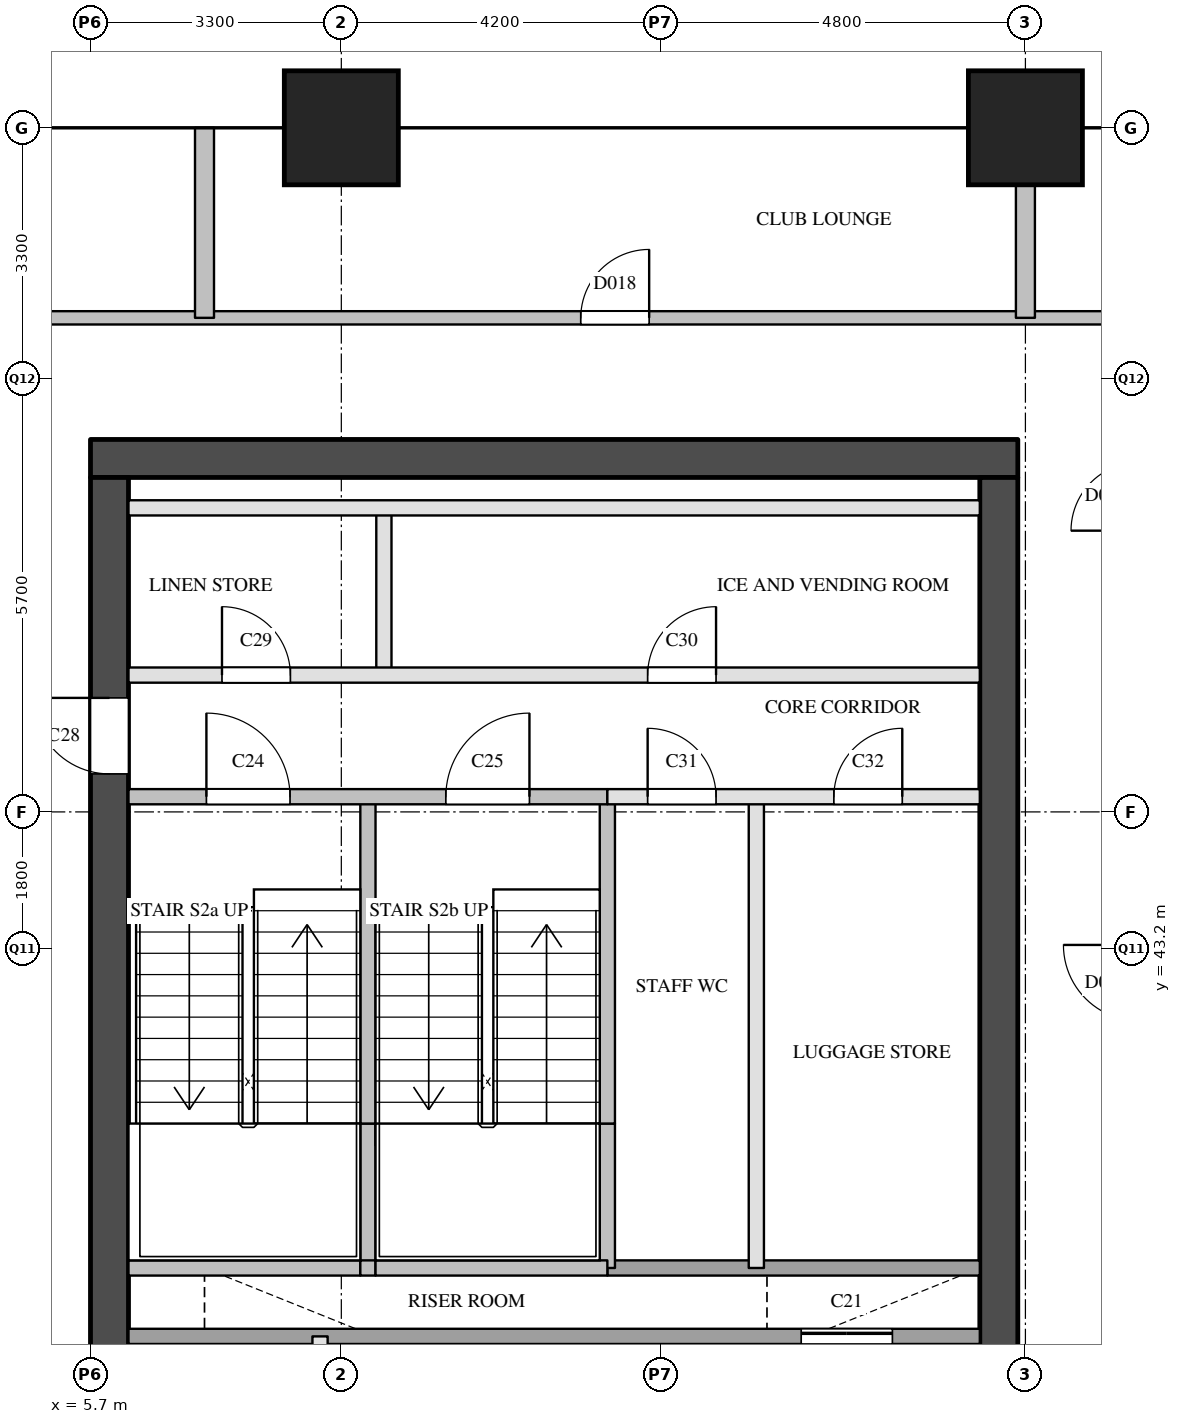
"""IFC4 building model, lengths in metres.
Left out: names, types, materials, properties, quantities, classifications, styles, units other than length and angle.
Written with IfcOpenShell. Run it as: python <this file> out.ifc"""

import sys

from ifc_helpers import new_model, si_unit, direction, frame, frame_2d, origin, origin_2d, place, context, subcontext, project, spatial, rectangle, extrude, element, fill, save


model = new_model("IFC4")
c1 = context("Model", 3, precision=1e-05, world=origin(), true_north=direction((0.0, 1.0)))
c2 = subcontext(c1, "Body", "Model", "MODEL_VIEW")
j1 = project(units=[si_unit("LENGTHUNIT", "METRE"), si_unit("PLANEANGLEUNIT", "RADIAN")], contexts=[c1])
p1 = place(None, origin())
s1 = spatial("IfcSite", under=j1, at=p1, CompositionType="ELEMENT")
p2 = place(p1, origin())
s2 = spatial("IfcBuilding", under=s1, at=p2, CompositionType="ELEMENT")
p3 = place(p2, frame((0.0, 0.0, 146.6)))
s3 = spatial("IfcBuildingStorey", under=s2, at=p3, CompositionType="ELEMENT", Elevation=146.6)
for number, where, z_axis, x_axis in (
    (1, (9.0, 54.0, 0.0), (0.0, 0.0, 1.0), (1.0, 0.0, 0.0)),
    (2, (18.0, 54.0, 0.0), (0.0, 0.0, 1.0), (1.0, 0.0, 0.0)),
):
    element("IfcColumn", number, at=place(p3, frame(where, z_axis=z_axis, x_axis=x_axis)), inside=s3, PredefinedType="COLUMN", context=c2, shape_type="SweptSolid", body=[
        extrude(rectangle(XDim=1.5, YDim=1.5, at=origin_2d()), origin(), (0.0, 0.0, 1.0), 3.9),
    ])
p4 = place(p3, frame((5.7, 49.65, 0.0), z_axis=(0.0, 0.0, 1.0), x_axis=(1.0, 0.0, 0.0)))
e3 = element("IfcWall", 3, at=p4, inside=s3, PredefinedType="SHEAR", context=c2, shape_type="SweptSolid", body=[
    extrude(rectangle(XDim=12.2, YDim=0.5, at=frame_2d((6.1, 0.0))), origin(), (0.0, 0.0, 1.0), 3.6),
])
p5 = place(p3, frame((5.95, 29.1, 0.0), z_axis=(0.0, 0.0, 1.0), x_axis=(0.0, 1.0, 0.0)))
e4 = element("IfcWall", 4, at=p5, inside=s3, PredefinedType="SHEAR", context=c2, shape_type="SweptSolid", body=[
    extrude(rectangle(XDim=20.3, YDim=0.5, at=frame_2d((10.15, 0.0))), origin(), (0.0, 0.0, 1.0), 3.6),
])
p6 = place(p5, frame((3.45, 0.0, 0.0)))
e5 = element("IfcOpeningElement", 5, at=p6, cuts=e4, PredefinedType="OPENING", context=c2, shape_type="SweptSolid", body=[
    extrude(rectangle(XDim=1.0, YDim=2.1, at=frame_2d((0.5, 1.05))), frame((0.0, 0.26, 0.0), z_axis=(0.0, -1.0, 0.0), x_axis=(1.0, 0.0, 0.0)), (0.0, 0.0, 1.0), 0.52),
])
p7 = place(p5, frame((16.4, 0.0, 0.0)))
e6 = element("IfcOpeningElement", 6, at=p7, cuts=e4, PredefinedType="OPENING", context=c2, shape_type="SweptSolid", body=[
    extrude(rectangle(XDim=1.0, YDim=2.1, at=frame_2d((0.5, 1.05))), frame((0.0, 0.26, 0.0), z_axis=(0.0, -1.0, 0.0), x_axis=(1.0, 0.0, 0.0)), (0.0, 0.0, 1.0), 0.52),
])
p8 = place(p3, frame((17.65, 29.1, 0.0), z_axis=(0.0, 0.0, 1.0), x_axis=(0.0, 1.0, 0.0)))
e7 = element("IfcWall", 7, at=p8, inside=s3, PredefinedType="SHEAR", context=c2, shape_type="SweptSolid", body=[
    extrude(rectangle(XDim=20.3, YDim=0.5, at=frame_2d((10.15, 0.0))), origin(), (0.0, 0.0, 1.0), 3.6),
])
p9 = place(p8, frame((1.25, 0.0, 0.0)))
e8 = element("IfcOpeningElement", 8, at=p9, cuts=e7, PredefinedType="OPENING", context=c2, shape_type="SweptSolid", body=[
    extrude(rectangle(XDim=0.7, YDim=2.1, at=frame_2d((0.35, 1.05))), frame((0.0, 0.26, 0.0), z_axis=(0.0, -1.0, 0.0), x_axis=(1.0, 0.0, 0.0)), (0.0, 0.0, 1.0), 0.52),
])
p10 = place(p8, frame((7.05, 0.0, 0.0)))
e9 = element("IfcOpeningElement", 9, at=p10, cuts=e7, PredefinedType="OPENING", context=c2, shape_type="SweptSolid", body=[
    extrude(rectangle(XDim=0.7, YDim=2.1, at=frame_2d((0.35, 1.05))), frame((0.0, 0.26, 0.0), z_axis=(0.0, -1.0, 0.0), x_axis=(1.0, 0.0, 0.0)), (0.0, 0.0, 1.0), 0.52),
])
p11 = place(p8, frame((3.6, 0.0, 0.0)))
e10 = element("IfcOpeningElement", 10, at=p11, cuts=e7, PredefinedType="OPENING", context=c2, shape_type="SweptSolid", body=[
    extrude(rectangle(XDim=1.8, YDim=2.1, at=frame_2d((0.9, 1.05))), frame((0.0, 0.26, 0.0), z_axis=(0.0, -1.0, 0.0), x_axis=(1.0, 0.0, 0.0)), (0.0, 0.0, 1.0), 0.52),
])
p12 = place(p3, frame((8.72, 33.8, 0.0), z_axis=(0.0, 0.0, 1.0), x_axis=(0.0, 1.0, 0.0)))
e11 = element("IfcWall", 11, at=p12, inside=s3, PredefinedType="PARTITIONING", context=c2, shape_type="SweptSolid", body=[
    extrude(rectangle(XDim=4.3, YDim=0.2, at=frame_2d((2.15, 0.0))), origin(), (0.0, 0.0, 1.0), 3.6),
])
p13 = place(p3, frame((9.35, 39.0, 0.0), z_axis=(0.0, 0.0, 1.0), x_axis=(0.0, 1.0, 0.0)))
e12 = element("IfcWall", 12, at=p13, inside=s3, PredefinedType="SOLIDWALL", context=c2, shape_type="SweptSolid", body=[
    extrude(rectangle(XDim=1.9, YDim=0.2, at=frame_2d((0.95, 0.0))), origin(), (0.0, 0.0, 1.0), 3.6),
])
p14 = place(p3, frame((9.35, 40.9, 0.0), z_axis=(0.0, 0.0, 1.0), x_axis=(0.0, 1.0, 0.0)))
e13 = element("IfcWall", 13, at=p14, inside=s3, PredefinedType="SOLIDWALL", context=c2, shape_type="SweptSolid", body=[
    extrude(rectangle(XDim=4.3, YDim=0.2, at=frame_2d((2.15, 0.0))), origin(), (0.0, 0.0, 1.0), 3.6),
])
p15 = place(p3, frame((9.56, 46.8, 0.0), z_axis=(0.0, 0.0, 1.0), x_axis=(0.0, 1.0, 0.0)))
e14 = element("IfcWall", 14, at=p15, inside=s3, PredefinedType="PARTITIONING", context=c2, shape_type="SweptSolid", body=[
    extrude(rectangle(XDim=2.2, YDim=0.2, at=frame_2d((1.1, 0.0))), origin(), (0.0, 0.0, 1.0), 3.6),
])
p16 = place(p3, frame((12.5, 39.0, 0.0), z_axis=(0.0, 0.0, 1.0), x_axis=(0.0, 1.0, 0.0)))
e15 = element("IfcWall", 15, at=p16, inside=s3, PredefinedType="SOLIDWALL", context=c2, shape_type="SweptSolid", body=[
    extrude(rectangle(XDim=1.9, YDim=0.2, at=frame_2d((0.95, 0.0))), origin(), (0.0, 0.0, 1.0), 3.6),
])
p17 = place(p3, frame((12.5, 40.9, 0.0), z_axis=(0.0, 0.0, 1.0), x_axis=(0.0, 1.0, 0.0)))
e16 = element("IfcWall", 16, at=p17, inside=s3, PredefinedType="SOLIDWALL", context=c2, shape_type="SweptSolid", body=[
    extrude(rectangle(XDim=4.3, YDim=0.2, at=frame_2d((2.15, 0.0))), origin(), (0.0, 0.0, 1.0), 3.6),
])
p18 = place(p3, frame((14.46, 39.0, 0.0), z_axis=(0.0, 0.0, 1.0), x_axis=(0.0, 1.0, 0.0)))
e17 = element("IfcWall", 17, at=p18, inside=s3, PredefinedType="PARTITIONING", context=c2, shape_type="SweptSolid", body=[
    extrude(rectangle(XDim=6.2, YDim=0.2, at=frame_2d((3.1, 0.0))), origin(), (0.0, 0.0, 1.0), 3.6),
])
for number, where, z_axis, x_axis in (
    (18, (14.6, 34.9, 0.0), (0.0, 0.0, 1.0), (0.0, 1.0, 0.0)),
    (19, (16.7, 34.9, 0.0), (0.0, 0.0, 1.0), (0.0, 1.0, 0.0)),
):
    element("IfcWall", number, at=place(p3, frame(where, z_axis=z_axis, x_axis=x_axis)), inside=s3, PredefinedType="SOLIDWALL", context=c2, shape_type="SweptSolid", body=[
        extrude(rectangle(XDim=3.2, YDim=0.2, at=frame_2d((1.6, 0.0))), origin(), (0.0, 0.0, 1.0), 3.6),
    ])
p19 = place(p3, frame((6.2, 38.1, 0.0), z_axis=(0.0, 0.0, 1.0), x_axis=(1.0, 0.0, 0.0)))
e20 = element("IfcWall", 20, at=p19, inside=s3, PredefinedType="SOLIDWALL", context=c2, shape_type="SweptSolid", body=[
    extrude(rectangle(XDim=11.2, YDim=0.2, at=frame_2d((5.6, 0.0))), origin(), (0.0, 0.0, 1.0), 3.6),
])
p20 = place(p19, frame((8.85, 0.0, 0.0)))
e21 = element("IfcOpeningElement", 21, at=p20, cuts=e20, PredefinedType="OPENING", context=c2, shape_type="SweptSolid", body=[
    extrude(rectangle(XDim=1.2, YDim=2.1, at=frame_2d((0.6, 1.05))), frame((0.0, 0.11, 0.0), z_axis=(0.0, -1.0, 0.0), x_axis=(1.0, 0.0, 0.0)), (0.0, 0.0, 1.0), 0.22),
])
p21 = place(p3, frame((12.5, 39.0, 0.0), z_axis=(0.0, 0.0, 1.0), x_axis=(1.0, 0.0, 0.0)))
e22 = element("IfcWall", 22, at=p21, inside=s3, PredefinedType="SOLIDWALL", context=c2, shape_type="SweptSolid", body=[
    extrude(rectangle(XDim=4.9, YDim=0.2, at=frame_2d((2.45, 0.0))), origin(), (0.0, 0.0, 1.0), 3.6),
])
p22 = place(p3, frame((6.2, 39.0, 0.0), z_axis=(0.0, 0.0, 1.0), x_axis=(1.0, 0.0, 0.0)))
e23 = element("IfcWall", 23, at=p22, inside=s3, PredefinedType="SOLIDWALL", context=c2, shape_type="SweptSolid", body=[
    extrude(rectangle(XDim=3.05, YDim=0.2, at=frame_2d((1.525, 0.0))), origin(), (0.0, 0.0, 1.0), 3.6),
])
p23 = place(p3, frame((9.25, 39.0, 0.0), z_axis=(0.0, 0.0, 1.0), x_axis=(1.0, 0.0, 0.0)))
e24 = element("IfcWall", 24, at=p23, inside=s3, PredefinedType="SOLIDWALL", context=c2, shape_type="SweptSolid", body=[
    extrude(rectangle(XDim=0.2, YDim=0.2, at=frame_2d((0.1, 0.0))), origin(), (0.0, 0.0, 1.0), 3.6),
])
p24 = place(p3, frame((9.45, 39.0, 0.0), z_axis=(0.0, 0.0, 1.0), x_axis=(1.0, 0.0, 0.0)))
e25 = element("IfcWall", 25, at=p24, inside=s3, PredefinedType="SOLIDWALL", context=c2, shape_type="SweptSolid", body=[
    extrude(rectangle(XDim=3.05, YDim=0.2, at=frame_2d((1.525, 0.0))), origin(), (0.0, 0.0, 1.0), 3.6),
])
p25 = place(p3, frame((12.5, 45.2, 0.0), z_axis=(0.0, 0.0, 1.0), x_axis=(1.0, 0.0, 0.0)))
e26 = element("IfcWall", 26, at=p25, inside=s3, PredefinedType="PARTITIONING", context=c2, shape_type="SweptSolid", body=[
    extrude(rectangle(XDim=4.9, YDim=0.2, at=frame_2d((2.45, 0.0))), origin(), (0.0, 0.0, 1.0), 3.6),
])
p26 = place(p25, frame((0.53, 0.0, 0.0)))
e27 = element("IfcOpeningElement", 27, at=p26, cuts=e26, PredefinedType="OPENING", context=c2, shape_type="SweptSolid", body=[
    extrude(rectangle(XDim=0.9, YDim=2.1, at=frame_2d((0.45, 1.05))), frame((0.0, 0.11, 0.0), z_axis=(0.0, -1.0, 0.0), x_axis=(1.0, 0.0, 0.0)), (0.0, 0.0, 1.0), 0.22),
])
p27 = place(p25, frame((2.98, 0.0, 0.0)))
e28 = element("IfcOpeningElement", 28, at=p27, cuts=e26, PredefinedType="OPENING", context=c2, shape_type="SweptSolid", body=[
    extrude(rectangle(XDim=0.9, YDim=2.1, at=frame_2d((0.45, 1.05))), frame((0.0, 0.11, 0.0), z_axis=(0.0, -1.0, 0.0), x_axis=(1.0, 0.0, 0.0)), (0.0, 0.0, 1.0), 0.22),
])
p28 = place(p3, frame((6.2, 45.2, 0.0), z_axis=(0.0, 0.0, 1.0), x_axis=(1.0, 0.0, 0.0)))
e29 = element("IfcWall", 29, at=p28, inside=s3, PredefinedType="SOLIDWALL", context=c2, shape_type="SweptSolid", body=[
    extrude(rectangle(XDim=6.3, YDim=0.2, at=frame_2d((3.15, 0.0))), origin(), (0.0, 0.0, 1.0), 3.6),
])
p29 = place(p28, frame((1.025, 0.0, 0.0)))
e30 = element("IfcOpeningElement", 30, at=p29, cuts=e29, PredefinedType="OPENING", context=c2, shape_type="SweptSolid", body=[
    extrude(rectangle(XDim=1.1, YDim=2.1, at=frame_2d((0.55, 1.05))), frame((0.0, 0.11, 0.0), z_axis=(0.0, -1.0, 0.0), x_axis=(1.0, 0.0, 0.0)), (0.0, 0.0, 1.0), 0.22),
])
p30 = place(p28, frame((4.175, 0.0, 0.0)))
e31 = element("IfcOpeningElement", 31, at=p30, cuts=e29, PredefinedType="OPENING", context=c2, shape_type="SweptSolid", body=[
    extrude(rectangle(XDim=1.1, YDim=2.1, at=frame_2d((0.55, 1.05))), frame((0.0, 0.11, 0.0), z_axis=(0.0, -1.0, 0.0), x_axis=(1.0, 0.0, 0.0)), (0.0, 0.0, 1.0), 0.22),
])
p31 = place(p3, frame((6.2, 46.8, 0.0), z_axis=(0.0, 0.0, 1.0), x_axis=(1.0, 0.0, 0.0)))
e32 = element("IfcWall", 32, at=p31, inside=s3, PredefinedType="PARTITIONING", context=c2, shape_type="SweptSolid", body=[
    extrude(rectangle(XDim=11.2, YDim=0.2, at=frame_2d((5.6, 0.0))), origin(), (0.0, 0.0, 1.0), 3.6),
])
p32 = place(p31, frame((1.23, 0.0, 0.0)))
e33 = element("IfcOpeningElement", 33, at=p32, cuts=e32, PredefinedType="OPENING", context=c2, shape_type="SweptSolid", body=[
    extrude(rectangle(XDim=0.9, YDim=2.1, at=frame_2d((0.45, 1.05))), frame((0.0, 0.11, 0.0), z_axis=(0.0, -1.0, 0.0), x_axis=(1.0, 0.0, 0.0)), (0.0, 0.0, 1.0), 0.22),
])
p33 = place(p31, frame((6.83, 0.0, 0.0)))
e34 = element("IfcOpeningElement", 34, at=p33, cuts=e32, PredefinedType="OPENING", context=c2, shape_type="SweptSolid", body=[
    extrude(rectangle(XDim=0.9, YDim=2.1, at=frame_2d((0.45, 1.05))), frame((0.0, 0.11, 0.0), z_axis=(0.0, -1.0, 0.0), x_axis=(1.0, 0.0, 0.0)), (0.0, 0.0, 1.0), 0.22),
])
p34 = place(p3, frame((6.2, 49.0, 0.0), z_axis=(0.0, 0.0, 1.0), x_axis=(1.0, 0.0, 0.0)))
e35 = element("IfcWall", 35, at=p34, inside=s3, PredefinedType="PARTITIONING", context=c2, shape_type="SweptSolid", body=[
    extrude(rectangle(XDim=11.2, YDim=0.2, at=frame_2d((5.6, 0.0))), origin(), (0.0, 0.0, 1.0), 3.6),
])
p35 = place(p3, frame((4.1, 51.5, 0.0), z_axis=(0.0, 0.0, 1.0), x_axis=(1.0, 0.0, 0.0)))
e36 = element("IfcWall", 36, at=p35, inside=s3, PredefinedType="PARTITIONING", context=c2, shape_type="SweptSolid", body=[
    extrude(rectangle(XDim=15.4, YDim=0.175, at=frame_2d((7.7, 0.0))), origin(), (0.0, 0.0, 1.0), 3.6),
])
p36 = place(p35, frame((8.05, 0.0, 0.0)))
e37 = element("IfcOpeningElement", 37, at=p36, cuts=e36, PredefinedType="OPENING", context=c2, shape_type="SweptSolid", body=[
    extrude(rectangle(XDim=0.9, YDim=2.1, at=frame_2d((0.45, 1.05))), frame((0.0, 0.097, 0.0), z_axis=(0.0, -1.0, 0.0), x_axis=(1.0, 0.0, 0.0)), (0.0, 0.0, 1.0), 0.195),
])
p37 = place(p3, frame((7.2, 51.5, 0.0), z_axis=(0.0, 0.0, 1.0), x_axis=(0.0, 1.0, 0.0)))
e38 = element("IfcWall", 38, at=p37, inside=s3, PredefinedType="PARTITIONING", context=c2, shape_type="SweptSolid", body=[
    extrude(rectangle(XDim=2.5, YDim=0.25, at=frame_2d((1.25, 0.0))), origin(), (0.0, 0.0, 1.0), 2.6),
])
p38 = place(p3, frame((18.0, 51.5, 0.0), z_axis=(0.0, 0.0, 1.0), x_axis=(0.0, 1.0, 0.0)))
e39 = element("IfcWall", 39, at=p38, inside=s3, PredefinedType="PARTITIONING", context=c2, shape_type="SweptSolid", body=[
    extrude(rectangle(XDim=2.5, YDim=0.25, at=frame_2d((1.25, 0.0))), origin(), (0.0, 0.0, 1.0), 3.6),
])
p39 = place(p20, origin())
e40 = element("IfcDoor", 40, at=p39, inside=s3, OperationType="SLIDING_TO_LEFT", PredefinedType="DOOR", context=c2, shape_type="SweptSolid", body=[
    extrude(rectangle(XDim=1.2, YDim=2.1, at=frame_2d((0.6, 1.05))), frame((0.0, 0.025, 0.0), z_axis=(0.0, -1.0, 0.0), x_axis=(1.0, 0.0, 0.0)), (0.0, 0.0, 1.0), 0.05),
])
fill(e21, e40)
p40 = place(p29, origin())
e41 = element("IfcDoor", 41, at=p40, inside=s3, OperationType="SINGLE_SWING_LEFT", PredefinedType="DOOR", context=c2, shape_type="SweptSolid", body=[
    extrude(rectangle(XDim=1.1, YDim=2.1, at=frame_2d((0.55, 1.05))), frame((0.0, 0.025, 0.0), z_axis=(0.0, -1.0, 0.0), x_axis=(1.0, 0.0, 0.0)), (0.0, 0.0, 1.0), 0.05),
])
fill(e30, e41)
p41 = place(p30, origin())
e42 = element("IfcDoor", 42, at=p41, inside=s3, OperationType="SINGLE_SWING_RIGHT", PredefinedType="DOOR", context=c2, shape_type="SweptSolid", body=[
    extrude(rectangle(XDim=1.1, YDim=2.1, at=frame_2d((0.55, 1.05))), frame((0.0, 0.025, 0.0), z_axis=(0.0, -1.0, 0.0), x_axis=(1.0, 0.0, 0.0)), (0.0, 0.0, 1.0), 0.05),
])
fill(e31, e42)
p42 = place(p7, origin())
e43 = element("IfcDoor", 43, at=p42, inside=s3, OperationType="SINGLE_SWING_RIGHT", PredefinedType="DOOR", context=c2, shape_type="SweptSolid", body=[
    extrude(rectangle(XDim=1.0, YDim=2.1, at=frame_2d((0.5, 1.05))), frame((0.0, 0.025, 0.0), z_axis=(0.0, -1.0, 0.0), x_axis=(1.0, 0.0, 0.0)), (0.0, 0.0, 1.0), 0.05),
])
fill(e6, e43)
p43 = place(p32, origin())
e44 = element("IfcDoor", 44, at=p43, inside=s3, OperationType="SINGLE_SWING_LEFT", PredefinedType="DOOR", context=c2, shape_type="SweptSolid", body=[
    extrude(rectangle(XDim=0.9, YDim=2.1, at=frame_2d((0.45, 1.05))), frame((0.0, 0.025, 0.0), z_axis=(0.0, -1.0, 0.0), x_axis=(1.0, 0.0, 0.0)), (0.0, 0.0, 1.0), 0.05),
])
fill(e33, e44)
p44 = place(p33, origin())
e45 = element("IfcDoor", 45, at=p44, inside=s3, OperationType="SINGLE_SWING_RIGHT", PredefinedType="DOOR", context=c2, shape_type="SweptSolid", body=[
    extrude(rectangle(XDim=0.9, YDim=2.1, at=frame_2d((0.45, 1.05))), frame((0.0, 0.025, 0.0), z_axis=(0.0, -1.0, 0.0), x_axis=(1.0, 0.0, 0.0)), (0.0, 0.0, 1.0), 0.05),
])
fill(e34, e45)
p45 = place(p26, origin())
e46 = element("IfcDoor", 46, at=p45, inside=s3, OperationType="SINGLE_SWING_LEFT", PredefinedType="DOOR", context=c2, shape_type="SweptSolid", body=[
    extrude(rectangle(XDim=0.9, YDim=2.1, at=frame_2d((0.45, 1.05))), frame((0.0, 0.025, 0.0), z_axis=(0.0, -1.0, 0.0), x_axis=(1.0, 0.0, 0.0)), (0.0, 0.0, 1.0), 0.05),
])
fill(e27, e46)
p46 = place(p27, origin())
e47 = element("IfcDoor", 47, at=p46, inside=s3, OperationType="SINGLE_SWING_RIGHT", PredefinedType="DOOR", context=c2, shape_type="SweptSolid", body=[
    extrude(rectangle(XDim=0.9, YDim=2.1, at=frame_2d((0.45, 1.05))), frame((0.0, 0.025, 0.0), z_axis=(0.0, -1.0, 0.0), x_axis=(1.0, 0.0, 0.0)), (0.0, 0.0, 1.0), 0.05),
])
fill(e28, e47)
p47 = place(p36, origin())
e48 = element("IfcDoor", 48, at=p47, inside=s3, OperationType="SINGLE_SWING_RIGHT", PredefinedType="DOOR", context=c2, shape_type="SweptSolid", body=[
    extrude(rectangle(XDim=0.9, YDim=2.1, at=frame_2d((0.45, 1.05))), frame((0.0, 0.025, 0.0), z_axis=(0.0, -1.0, 0.0), x_axis=(1.0, 0.0, 0.0)), (0.0, 0.0, 1.0), 0.05),
])
fill(e37, e48)
save(model, sys.argv[1])
